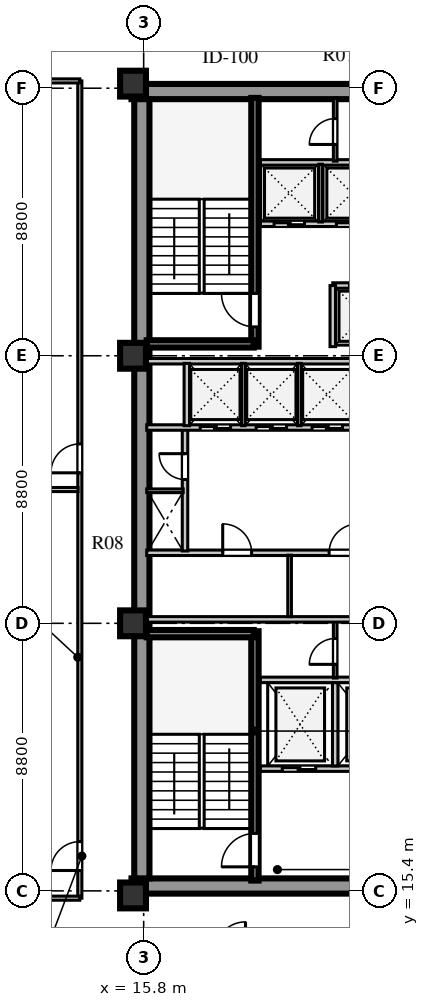
"""IFC4 building model, lengths in metres.
Left out: names, types, materials, properties, quantities, classifications, styles, units other than length and angle.
Written with IfcOpenShell. Run it as: python <this file> out.ifc"""

import sys

from ifc_helpers import new_model, si_unit, direction, frame, frame_2d, origin, origin_2d, place, context, subcontext, project, spatial, rectangle, extrude, element, fill, save


model = new_model("IFC4")
c1 = context("Model", 3, precision=1e-05, world=origin(), true_north=direction((0.0, 1.0)))
c2 = subcontext(c1, "Body", "Model", "MODEL_VIEW")
j1 = project(units=[si_unit("LENGTHUNIT", "METRE"), si_unit("PLANEANGLEUNIT", "RADIAN")], contexts=[c1])
p1 = place(None, origin())
s1 = spatial("IfcSite", under=j1, at=p1, CompositionType="ELEMENT")
p2 = place(p1, origin())
s2 = spatial("IfcBuilding", under=s1, at=p2, CompositionType="ELEMENT")
p3 = place(p2, frame((0.0, 0.0, 119.4)))
s3 = spatial("IfcBuildingStorey", under=s2, at=p3, CompositionType="ELEMENT", Elevation=119.4)
for number, where, z_axis, x_axis in (
    (1, (15.4, 15.56, 0.0), (0.0, 0.0, 1.0), (1.0, 0.0, 0.0)),
    (2, (15.4, 41.69, 0.0), (0.0, 0.0, 1.0), (1.0, 0.0, 0.0)),
):
    element("IfcWall", number, at=place(p3, frame(where, z_axis=z_axis, x_axis=x_axis)), inside=s3, PredefinedType="SHEAR", context=c2, shape_type="SweptSolid", body=[
        extrude(rectangle(XDim=9.68, YDim=0.5, at=frame_2d((4.84, 0.0))), origin(), (0.0, 0.0, 1.0), 3.6),
    ])
p4 = place(p3, frame((15.74, 15.81, 0.0), z_axis=(0.0, 0.0, 1.0), x_axis=(0.0, 1.0, 0.0)))
e3 = element("IfcWall", 3, at=p4, inside=s3, PredefinedType="SHEAR", context=c2, shape_type="SweptSolid", body=[
    extrude(rectangle(XDim=25.63, YDim=0.5, at=frame_2d((12.815, 0.0))), origin(), (0.0, 0.0, 1.0), 3.6),
])
for number, where, z_axis, x_axis in (
    (4, (15.45, 15.25, 0.0), (0.0, 0.0, 1.0), (1.0, 0.0, 0.0)),
    (5, (15.45, 24.2, 0.0), (0.0, 0.0, 1.0), (1.0, 0.0, 0.0)),
    (6, (15.45, 33.0, 0.0), (0.0, 0.0, 1.0), (1.0, 0.0, 0.0)),
    (7, (15.45, 41.95, 0.0), (0.0, 0.0, 1.0), (1.0, 0.0, 0.0)),
):
    element("IfcColumn", number, at=place(p3, frame(where, z_axis=z_axis, x_axis=x_axis)), inside=s3, PredefinedType="COLUMN", context=c2, shape_type="SweptSolid", body=[
        extrude(rectangle(XDim=0.85, YDim=0.85, at=origin_2d()), origin(), (0.0, 0.0, 1.0), 3.6),
    ])
p5 = place(p3, frame((19.46, 15.74, 0.0), z_axis=(0.0, 0.0, 1.0), x_axis=(0.0, 1.0, 0.0)))
e8 = element("IfcWall", 8, at=p5, inside=s3, PredefinedType="SHEAR", context=c2, shape_type="SweptSolid", body=[
    extrude(rectangle(XDim=8.2, YDim=0.24, at=frame_2d((4.1, 0.0))), origin(), (0.0, 0.0, 1.0), 3.85),
])
p6 = place(p5, frame((0.45, 0.0, 0.0)))
e9 = element("IfcOpeningElement", 9, at=p6, cuts=e8, PredefinedType="OPENING", context=c2, shape_type="SweptSolid", body=[
    extrude(rectangle(XDim=1.1, YDim=2.1, at=frame_2d((0.55, 1.05))), frame((0.0, 0.13, 0.0), z_axis=(0.0, -1.0, 0.0), x_axis=(1.0, 0.0, 0.0)), (0.0, 0.0, 1.0), 0.26),
])
p7 = place(p3, frame((15.9, 23.86, 0.0), z_axis=(0.0, 0.0, 1.0), x_axis=(1.0, 0.0, 0.0)))
e10 = element("IfcWall", 10, at=p7, inside=s3, PredefinedType="SHEAR", context=c2, shape_type="SweptSolid", body=[
    extrude(rectangle(XDim=3.52, YDim=0.24, at=frame_2d((1.76, 0.0))), origin(), (0.0, 0.0, 1.0), 3.85),
])
p8 = place(p3, frame((19.64, 19.42, 0.0), z_axis=(0.0, 0.0, 1.0), x_axis=(1.0, 0.0, 0.0)))
e11 = element("IfcWall", 11, at=p8, inside=s3, PredefinedType="SOLIDWALL", context=c2, shape_type="SweptSolid", body=[
    extrude(rectangle(XDim=4.94, YDim=0.18, at=frame_2d((2.47, 0.0))), origin(), (0.0, 0.0, 1.0), 3.6),
])
p9 = place(p8, frame((0.72, 0.0, 0.0)))
e12 = element("IfcOpeningElement", 12, at=p9, cuts=e11, PredefinedType="OPENING", context=c2, shape_type="SweptSolid", body=[
    extrude(rectangle(XDim=1.1, YDim=2.1, at=frame_2d((0.55, 1.05))), frame((0.0, 0.1, 0.0), z_axis=(0.0, -1.0, 0.0), x_axis=(1.0, 0.0, 0.0)), (0.0, 0.0, 1.0), 0.2),
])
p10 = place(p8, frame((3.02, 0.0, 0.0)))
e13 = element("IfcOpeningElement", 13, at=p10, cuts=e11, PredefinedType="OPENING", context=c2, shape_type="SweptSolid", body=[
    extrude(rectangle(XDim=1.1, YDim=2.1, at=frame_2d((0.55, 1.05))), frame((0.0, 0.1, 0.0), z_axis=(0.0, -1.0, 0.0), x_axis=(1.0, 0.0, 0.0)), (0.0, 0.0, 1.0), 0.2),
])
p11 = place(p3, frame((22.1, 19.51, 0.0), z_axis=(0.0, 0.0, 1.0), x_axis=(0.0, 1.0, 0.0)))
e14 = element("IfcWall", 14, at=p11, inside=s3, PredefinedType="SOLIDWALL", context=c2, shape_type="SweptSolid", body=[
    extrude(rectangle(XDim=2.74, YDim=0.18, at=frame_2d((1.37, 0.0))), origin(), (0.0, 0.0, 1.0), 3.6),
])
p12 = place(p3, frame((19.64, 22.34, 0.0), z_axis=(0.0, 0.0, 1.0), x_axis=(1.0, 0.0, 0.0)))
e15 = element("IfcWall", 15, at=p12, inside=s3, PredefinedType="SOLIDWALL", context=c2, shape_type="SweptSolid", body=[
    extrude(rectangle(XDim=4.94, YDim=0.18, at=frame_2d((2.47, 0.0))), origin(), (0.0, 0.0, 1.0), 3.6),
])
p13 = place(p3, frame((22.1, 22.4, 0.0), z_axis=(0.0, 0.0, 1.0), x_axis=(0.0, 1.0, 0.0)))
e16 = element("IfcWall", 16, at=p13, inside=s3, PredefinedType="PARTITIONING", context=c2, shape_type="SweptSolid", body=[
    extrude(rectangle(XDim=1.88, YDim=0.12, at=frame_2d((0.94, 0.0))), origin(), (0.0, 0.0, 1.0), 3.6),
])
p14 = place(p13, frame((0.45, 0.0, 0.0)))
e17 = element("IfcOpeningElement", 17, at=p14, cuts=e16, PredefinedType="OPENING", context=c2, shape_type="SweptSolid", body=[
    extrude(rectangle(XDim=0.85, YDim=2.06, at=frame_2d((0.425, 1.03))), frame((0.0, 0.07, 0.0), z_axis=(0.0, -1.0, 0.0), x_axis=(1.0, 0.0, 0.0)), (0.0, 0.0, 1.0), 0.14),
])
p15 = place(p3, frame((15.9, 26.52, 0.0), z_axis=(0.0, 0.0, 1.0), x_axis=(1.0, 0.0, 0.0)))
e18 = element("IfcWall", 18, at=p15, inside=s3, PredefinedType="SOLIDWALL", context=c2, shape_type="SweptSolid", body=[
    extrude(rectangle(XDim=8.68, YDim=0.18, at=frame_2d((4.34, 0.0))), origin(), (0.0, 0.0, 1.0), 3.6),
])
p16 = place(p15, frame((2.5, 0.0, 0.0)))
e19 = element("IfcOpeningElement", 19, at=p16, cuts=e18, PredefinedType="OPENING", context=c2, shape_type="SweptSolid", body=[
    extrude(rectangle(XDim=0.95, YDim=2.1, at=frame_2d((0.475, 1.05))), frame((0.0, 0.1, 0.0), z_axis=(0.0, -1.0, 0.0), x_axis=(1.0, 0.0, 0.0)), (0.0, 0.0, 1.0), 0.2),
])
p17 = place(p15, frame((6.0, 0.0, 0.0)))
e20 = element("IfcOpeningElement", 20, at=p17, cuts=e18, PredefinedType="OPENING", context=c2, shape_type="SweptSolid", body=[
    extrude(rectangle(XDim=0.95, YDim=2.1, at=frame_2d((0.475, 1.05))), frame((0.0, 0.1, 0.0), z_axis=(0.0, -1.0, 0.0), x_axis=(1.0, 0.0, 0.0)), (0.0, 0.0, 1.0), 0.2),
])
p18 = place(p3, frame((15.9, 24.33, 0.0), z_axis=(0.0, 0.0, 1.0), x_axis=(1.0, 0.0, 0.0)))
e21 = element("IfcWall", 21, at=p18, inside=s3, PredefinedType="SOLIDWALL", context=c2, shape_type="SweptSolid", body=[
    extrude(rectangle(XDim=8.68, YDim=0.18, at=frame_2d((4.34, 0.0))), origin(), (0.0, 0.0, 1.0), 2.95),
])
p19 = place(p3, frame((20.6, 24.42, 0.0), z_axis=(0.0, 0.0, 1.0), x_axis=(0.0, 1.0, 0.0)))
e22 = element("IfcWall", 22, at=p19, inside=s3, PredefinedType="PARTITIONING", context=c2, shape_type="SweptSolid", body=[
    extrude(rectangle(XDim=2.02, YDim=0.12, at=frame_2d((1.01, 0.0))), origin(), (0.0, 0.0, 1.0), 3.6),
])
p20 = place(p3, frame((17.16, 26.58, 0.0), z_axis=(0.0, 0.0, 1.0), x_axis=(0.0, 1.0, 0.0)))
e23 = element("IfcWall", 23, at=p20, inside=s3, PredefinedType="SOLIDWALL", context=c2, shape_type="SweptSolid", body=[
    extrude(rectangle(XDim=4.02, YDim=0.18, at=frame_2d((2.01, 0.0))), origin(), (0.0, 0.0, 1.0), 3.6),
])
p21 = place(p20, frame((2.35, 0.0, 0.0)))
e24 = element("IfcOpeningElement", 24, at=p21, cuts=e23, PredefinedType="OPENING", context=c2, shape_type="SweptSolid", body=[
    extrude(rectangle(XDim=0.85, YDim=2.06, at=frame_2d((0.425, 1.03))), frame((0.0, 0.1, 0.0), z_axis=(0.0, -1.0, 0.0), x_axis=(1.0, 0.0, 0.0)), (0.0, 0.0, 1.0), 0.2),
])
p22 = place(p3, frame((15.9, 28.56, 0.0), z_axis=(0.0, 0.0, 1.0), x_axis=(1.0, 0.0, 0.0)))
e25 = element("IfcWall", 25, at=p22, inside=s3, PredefinedType="PARTITIONING", context=c2, shape_type="SweptSolid", body=[
    extrude(rectangle(XDim=1.2, YDim=0.12, at=frame_2d((0.6, 0.0))), origin(), (0.0, 0.0, 1.0), 3.6),
])
p23 = place(p3, frame((15.9, 30.64, 0.0), z_axis=(0.0, 0.0, 1.0), x_axis=(1.0, 0.0, 0.0)))
e26 = element("IfcWall", 26, at=p23, inside=s3, PredefinedType="SOLIDWALL", context=c2, shape_type="SweptSolid", body=[
    extrude(rectangle(XDim=8.68, YDim=0.18, at=frame_2d((4.34, 0.0))), origin(), (0.0, 0.0, 1.0), 3.6),
])
p24 = place(p23, frame((1.76, 0.0, 0.0)))
e27 = element("IfcOpeningElement", 27, at=p24, cuts=e26, PredefinedType="OPENING", context=c2, shape_type="SweptSolid", body=[
    extrude(rectangle(XDim=1.0, YDim=2.1, at=frame_2d((0.5, 1.05))), frame((0.0, 0.1, 0.0), z_axis=(0.0, -1.0, 0.0), x_axis=(1.0, 0.0, 0.0)), (0.0, 0.0, 1.0), 0.2),
])
p25 = place(p23, frame((3.6, 0.0, 0.0)))
e28 = element("IfcOpeningElement", 28, at=p25, cuts=e26, PredefinedType="OPENING", context=c2, shape_type="SweptSolid", body=[
    extrude(rectangle(XDim=1.0, YDim=2.1, at=frame_2d((0.5, 1.05))), frame((0.0, 0.1, 0.0), z_axis=(0.0, -1.0, 0.0), x_axis=(1.0, 0.0, 0.0)), (0.0, 0.0, 1.0), 0.2),
])
p26 = place(p23, frame((5.44, 0.0, 0.0)))
e29 = element("IfcOpeningElement", 29, at=p26, cuts=e26, PredefinedType="OPENING", context=c2, shape_type="SweptSolid", body=[
    extrude(rectangle(XDim=1.0, YDim=2.1, at=frame_2d((0.5, 1.05))), frame((0.0, 0.1, 0.0), z_axis=(0.0, -1.0, 0.0), x_axis=(1.0, 0.0, 0.0)), (0.0, 0.0, 1.0), 0.2),
])
p27 = place(p23, frame((7.28, 0.0, 0.0)))
e30 = element("IfcOpeningElement", 30, at=p27, cuts=e26, PredefinedType="OPENING", context=c2, shape_type="SweptSolid", body=[
    extrude(rectangle(XDim=1.0, YDim=2.1, at=frame_2d((0.5, 1.05))), frame((0.0, 0.1, 0.0), z_axis=(0.0, -1.0, 0.0), x_axis=(1.0, 0.0, 0.0)), (0.0, 0.0, 1.0), 0.2),
])
p28 = place(p3, frame((15.9, 32.82, 0.0), z_axis=(0.0, 0.0, 1.0), x_axis=(1.0, 0.0, 0.0)))
e31 = element("IfcWall", 31, at=p28, inside=s3, PredefinedType="SOLIDWALL", context=c2, shape_type="SweptSolid", body=[
    extrude(rectangle(XDim=8.68, YDim=0.18, at=frame_2d((4.34, 0.0))), origin(), (0.0, 0.0, 1.0), 2.95),
])
p29 = place(p3, frame((17.22, 30.7, 0.0), z_axis=(0.0, 0.0, 1.0), x_axis=(0.0, 1.0, 0.0)))
e32 = element("IfcWall", 32, at=p29, inside=s3, PredefinedType="SOLIDWALL", context=c2, shape_type="SweptSolid", body=[
    extrude(rectangle(XDim=2.05, YDim=0.18, at=frame_2d((1.025, 0.0))), origin(), (0.0, 0.0, 1.0), 3.6),
])
for number, where, z_axis, x_axis in (
    (33, (19.08, 30.7, 0.0), (0.0, 0.0, 1.0), (0.0, 1.0, 0.0)),
    (34, (20.92, 30.7, 0.0), (0.0, 0.0, 1.0), (0.0, 1.0, 0.0)),
):
    element("IfcWall", number, at=place(p3, frame(where, z_axis=z_axis, x_axis=x_axis)), inside=s3, PredefinedType="PARTITIONING", context=c2, shape_type="SweptSolid", body=[
        extrude(rectangle(XDim=2.05, YDim=0.12, at=frame_2d((1.025, 0.0))), origin(), (0.0, 0.0, 1.0), 3.6),
    ])
p30 = place(p3, frame((19.46, 33.3, 0.0), z_axis=(0.0, 0.0, 1.0), x_axis=(0.0, 1.0, 0.0)))
e35 = element("IfcWall", 35, at=p30, inside=s3, PredefinedType="SHEAR", context=c2, shape_type="SweptSolid", body=[
    extrude(rectangle(XDim=8.18, YDim=0.24, at=frame_2d((4.09, 0.0))), origin(), (0.0, 0.0, 1.0), 3.85),
])
p31 = place(p30, frame((0.65, 0.0, 0.0)))
e36 = element("IfcOpeningElement", 36, at=p31, cuts=e35, PredefinedType="OPENING", context=c2, shape_type="SweptSolid", body=[
    extrude(rectangle(XDim=1.1, YDim=2.1, at=frame_2d((0.55, 1.05))), frame((0.0, 0.13, 0.0), z_axis=(0.0, -1.0, 0.0), x_axis=(1.0, 0.0, 0.0)), (0.0, 0.0, 1.0), 0.26),
])
p32 = place(p3, frame((15.9, 33.39, 0.0), z_axis=(0.0, 0.0, 1.0), x_axis=(1.0, 0.0, 0.0)))
e37 = element("IfcWall", 37, at=p32, inside=s3, PredefinedType="SHEAR", context=c2, shape_type="SweptSolid", body=[
    extrude(rectangle(XDim=3.52, YDim=0.24, at=frame_2d((1.76, 0.0))), origin(), (0.0, 0.0, 1.0), 3.85),
])
p33 = place(p3, frame((22.02, 35.31, 0.0), z_axis=(0.0, 0.0, 1.0), x_axis=(1.0, 0.0, 0.0)))
e38 = element("IfcWall", 38, at=p33, inside=s3, PredefinedType="SOLIDWALL", context=c2, shape_type="SweptSolid", body=[
    extrude(rectangle(XDim=2.56, YDim=0.18, at=frame_2d((1.28, 0.0))), origin(), (0.0, 0.0, 1.0), 3.6),
])
p34 = place(p33, frame((0.55, 0.0, 0.0)))
e39 = element("IfcOpeningElement", 39, at=p34, cuts=e38, PredefinedType="OPENING", context=c2, shape_type="SweptSolid", body=[
    extrude(rectangle(XDim=1.0, YDim=2.1, at=frame_2d((0.5, 1.05))), frame((0.0, 0.1, 0.0), z_axis=(0.0, -1.0, 0.0), x_axis=(1.0, 0.0, 0.0)), (0.0, 0.0, 1.0), 0.2),
])
p35 = place(p3, frame((22.02, 33.3, 0.0), z_axis=(0.0, 0.0, 1.0), x_axis=(0.0, 1.0, 0.0)))
e40 = element("IfcWall", 40, at=p35, inside=s3, PredefinedType="SOLIDWALL", context=c2, shape_type="SweptSolid", body=[
    extrude(rectangle(XDim=2.01, YDim=0.18, at=frame_2d((1.005, 0.0))), origin(), (0.0, 0.0, 1.0), 3.6),
])
p36 = place(p3, frame((19.64, 37.34, 0.0), z_axis=(0.0, 0.0, 1.0), x_axis=(1.0, 0.0, 0.0)))
e41 = element("IfcWall", 41, at=p36, inside=s3, PredefinedType="SOLIDWALL", context=c2, shape_type="SweptSolid", body=[
    extrude(rectangle(XDim=4.94, YDim=0.18, at=frame_2d((2.47, 0.0))), origin(), (0.0, 0.0, 1.0), 3.6),
])
p37 = place(p36, frame((0.45, 0.0, 0.0)))
e42 = element("IfcOpeningElement", 42, at=p37, cuts=e41, PredefinedType="OPENING", context=c2, shape_type="SweptSolid", body=[
    extrude(rectangle(XDim=1.0, YDim=2.1, at=frame_2d((0.5, 1.05))), frame((0.0, 0.1, 0.0), z_axis=(0.0, -1.0, 0.0), x_axis=(1.0, 0.0, 0.0)), (0.0, 0.0, 1.0), 0.2),
])
p38 = place(p36, frame((2.5, 0.0, 0.0)))
e43 = element("IfcOpeningElement", 43, at=p38, cuts=e41, PredefinedType="OPENING", context=c2, shape_type="SweptSolid", body=[
    extrude(rectangle(XDim=1.0, YDim=2.1, at=frame_2d((0.5, 1.05))), frame((0.0, 0.1, 0.0), z_axis=(0.0, -1.0, 0.0), x_axis=(1.0, 0.0, 0.0)), (0.0, 0.0, 1.0), 0.2),
])
p39 = place(p3, frame((19.64, 39.36, 0.0), z_axis=(0.0, 0.0, 1.0), x_axis=(1.0, 0.0, 0.0)))
e44 = element("IfcWall", 44, at=p39, inside=s3, PredefinedType="SOLIDWALL", context=c2, shape_type="SweptSolid", body=[
    extrude(rectangle(XDim=4.94, YDim=0.18, at=frame_2d((2.47, 0.0))), origin(), (0.0, 0.0, 1.0), 3.6),
])
p40 = place(p3, frame((21.62, 37.4, 0.0), z_axis=(0.0, 0.0, 1.0), x_axis=(0.0, 1.0, 0.0)))
e45 = element("IfcWall", 45, at=p40, inside=s3, PredefinedType="PARTITIONING", context=c2, shape_type="SweptSolid", body=[
    extrude(rectangle(XDim=1.9, YDim=0.12, at=frame_2d((0.95, 0.0))), origin(), (0.0, 0.0, 1.0), 3.6),
])
p41 = place(p3, frame((22.1, 39.4, 0.0), z_axis=(0.0, 0.0, 1.0), x_axis=(0.0, 1.0, 0.0)))
e46 = element("IfcWall", 46, at=p41, inside=s3, PredefinedType="PARTITIONING", context=c2, shape_type="SweptSolid", body=[
    extrude(rectangle(XDim=2.08, YDim=0.12, at=frame_2d((1.04, 0.0))), origin(), (0.0, 0.0, 1.0), 3.6),
])
p42 = place(p41, frame((0.55, 0.0, 0.0)))
e47 = element("IfcOpeningElement", 47, at=p42, cuts=e46, PredefinedType="OPENING", context=c2, shape_type="SweptSolid", body=[
    extrude(rectangle(XDim=0.85, YDim=2.06, at=frame_2d((0.425, 1.03))), frame((0.0, 0.07, 0.0), z_axis=(0.0, -1.0, 0.0), x_axis=(1.0, 0.0, 0.0)), (0.0, 0.0, 1.0), 0.14),
])
p43 = place(p3, frame((13.7, 15.16, 0.0), z_axis=(0.0, 0.0, 1.0), x_axis=(0.0, 1.0, 0.0)))
e48 = element("IfcWall", 48, at=p43, inside=s3, PredefinedType="PARTITIONING", context=c2, shape_type="SweptSolid", body=[
    extrude(rectangle(XDim=26.88, YDim=0.135, at=frame_2d((13.44, 0.0))), origin(), (0.0, 0.0, 1.0), 3.6),
])
p44 = place(p43, frame((0.91, 0.0, 0.0)))
e49 = element("IfcOpeningElement", 49, at=p44, cuts=e48, PredefinedType="OPENING", context=c2, shape_type="SweptSolid", body=[
    extrude(rectangle(XDim=0.95, YDim=2.1, at=frame_2d((0.475, 1.05))), frame((0.0, 0.078, 0.0), z_axis=(0.0, -1.0, 0.0), x_axis=(1.0, 0.0, 0.0)), (0.0, 0.0, 1.0), 0.155),
])
p45 = place(p43, frame((13.99, 0.0, 0.0)))
e50 = element("IfcOpeningElement", 50, at=p45, cuts=e48, PredefinedType="OPENING", context=c2, shape_type="SweptSolid", body=[
    extrude(rectangle(XDim=0.95, YDim=2.1, at=frame_2d((0.475, 1.05))), frame((0.0, 0.078, 0.0), z_axis=(0.0, -1.0, 0.0), x_axis=(1.0, 0.0, 0.0)), (0.0, 0.0, 1.0), 0.155),
])
for number, where, z_axis, x_axis in (
    (51, (10.48, 15.16, 0.0), (0.0, 0.0, 1.0), (1.0, 0.0, 0.0)),
    (52, (10.48, 42.04, 0.0), (0.0, 0.0, 1.0), (1.0, 0.0, 0.0)),
):
    element("IfcWall", number, at=place(p3, frame(where, z_axis=z_axis, x_axis=x_axis)), inside=s3, PredefinedType="PARTITIONING", context=c2, shape_type="SweptSolid", body=[
        extrude(rectangle(XDim=3.22, YDim=0.135, at=frame_2d((1.61, 0.0))), origin(), (0.0, 0.0, 1.0), 3.1),
    ])
p46 = place(p3, frame((10.48, 28.6, 0.0), z_axis=(0.0, 0.0, 1.0), x_axis=(1.0, 0.0, 0.0)))
e53 = element("IfcWall", 53, at=p46, inside=s3, PredefinedType="PARTITIONING", context=c2, shape_type="SweptSolid", body=[
    extrude(rectangle(XDim=3.16, YDim=0.135, at=frame_2d((1.58, 0.0))), origin(), (0.0, 0.0, 1.0), 3.6),
])
p47 = place(p6, origin())
e54 = element("IfcDoor", 54, at=p47, inside=s3, OperationType="SINGLE_SWING_LEFT", PredefinedType="DOOR", context=c2, shape_type="SweptSolid", body=[
    extrude(rectangle(XDim=1.1, YDim=2.1, at=frame_2d((0.55, 1.05))), frame((0.0, 0.025, 0.0), z_axis=(0.0, -1.0, 0.0), x_axis=(1.0, 0.0, 0.0)), (0.0, 0.0, 1.0), 0.05),
])
fill(e9, e54)
p48 = place(p9, origin())
e55 = element("IfcDoor", 55, at=p48, inside=s3, OperationType="DOUBLE_DOOR_SLIDING", PredefinedType="DOOR", context=c2, shape_type="SweptSolid", body=[
    extrude(rectangle(XDim=1.1, YDim=2.1, at=frame_2d((0.55, 1.05))), frame((0.0, 0.025, 0.0), z_axis=(0.0, -1.0, 0.0), x_axis=(1.0, 0.0, 0.0)), (0.0, 0.0, 1.0), 0.05),
])
fill(e12, e55)
p49 = place(p14, origin())
e56 = element("IfcDoor", 56, at=p49, inside=s3, OperationType="SINGLE_SWING_LEFT", PredefinedType="DOOR", context=c2, shape_type="SweptSolid", body=[
    extrude(rectangle(XDim=0.85, YDim=2.06, at=frame_2d((0.425, 1.03))), frame((0.0, 0.025, 0.0), z_axis=(0.0, -1.0, 0.0), x_axis=(1.0, 0.0, 0.0)), (0.0, 0.0, 1.0), 0.05),
])
fill(e17, e56)
p50 = place(p16, origin())
e57 = element("IfcDoor", 57, at=p50, inside=s3, OperationType="SINGLE_SWING_LEFT", PredefinedType="DOOR", context=c2, shape_type="SweptSolid", body=[
    extrude(rectangle(XDim=0.95, YDim=2.1, at=frame_2d((0.475, 1.05))), frame((0.0, 0.025, 0.0), z_axis=(0.0, -1.0, 0.0), x_axis=(1.0, 0.0, 0.0)), (0.0, 0.0, 1.0), 0.05),
])
fill(e19, e57)
p51 = place(p17, origin())
e58 = element("IfcDoor", 58, at=p51, inside=s3, OperationType="SINGLE_SWING_RIGHT", PredefinedType="DOOR", context=c2, shape_type="SweptSolid", body=[
    extrude(rectangle(XDim=0.95, YDim=2.1, at=frame_2d((0.475, 1.05))), frame((0.0, 0.025, 0.0), z_axis=(0.0, -1.0, 0.0), x_axis=(1.0, 0.0, 0.0)), (0.0, 0.0, 1.0), 0.05),
])
fill(e20, e58)
p52 = place(p21, origin())
e59 = element("IfcDoor", 59, at=p52, inside=s3, OperationType="SINGLE_SWING_RIGHT", PredefinedType="DOOR", context=c2, shape_type="SweptSolid", body=[
    extrude(rectangle(XDim=0.85, YDim=2.06, at=frame_2d((0.425, 1.03))), frame((0.0, 0.025, 0.0), z_axis=(0.0, -1.0, 0.0), x_axis=(1.0, 0.0, 0.0)), (0.0, 0.0, 1.0), 0.05),
])
fill(e24, e59)
p53 = place(p24, frame((1.0, 0.0, 0.0), z_axis=(0.0, 0.0, 1.0), x_axis=(-1.0, 0.0, 0.0)))
e60 = element("IfcDoor", 60, at=p53, inside=s3, OperationType="DOUBLE_DOOR_SLIDING", PredefinedType="DOOR", context=c2, shape_type="SweptSolid", body=[
    extrude(rectangle(XDim=1.0, YDim=2.1, at=frame_2d((0.5, 1.05))), frame((0.0, 0.025, 0.0), z_axis=(0.0, -1.0, 0.0), x_axis=(1.0, 0.0, 0.0)), (0.0, 0.0, 1.0), 0.05),
])
fill(e27, e60)
p54 = place(p25, frame((1.0, 0.0, 0.0), z_axis=(0.0, 0.0, 1.0), x_axis=(-1.0, 0.0, 0.0)))
e61 = element("IfcDoor", 61, at=p54, inside=s3, OperationType="DOUBLE_DOOR_SLIDING", PredefinedType="DOOR", context=c2, shape_type="SweptSolid", body=[
    extrude(rectangle(XDim=1.0, YDim=2.1, at=frame_2d((0.5, 1.05))), frame((0.0, 0.025, 0.0), z_axis=(0.0, -1.0, 0.0), x_axis=(1.0, 0.0, 0.0)), (0.0, 0.0, 1.0), 0.05),
])
fill(e28, e61)
p55 = place(p26, frame((1.0, 0.0, 0.0), z_axis=(0.0, 0.0, 1.0), x_axis=(-1.0, 0.0, 0.0)))
e62 = element("IfcDoor", 62, at=p55, inside=s3, OperationType="DOUBLE_DOOR_SLIDING", PredefinedType="DOOR", context=c2, shape_type="SweptSolid", body=[
    extrude(rectangle(XDim=1.0, YDim=2.1, at=frame_2d((0.5, 1.05))), frame((0.0, 0.025, 0.0), z_axis=(0.0, -1.0, 0.0), x_axis=(1.0, 0.0, 0.0)), (0.0, 0.0, 1.0), 0.05),
])
fill(e29, e62)
p56 = place(p31, origin())
e63 = element("IfcDoor", 63, at=p56, inside=s3, OperationType="SINGLE_SWING_RIGHT", PredefinedType="DOOR", context=c2, shape_type="SweptSolid", body=[
    extrude(rectangle(XDim=1.1, YDim=2.1, at=frame_2d((0.55, 1.05))), frame((0.0, 0.025, 0.0), z_axis=(0.0, -1.0, 0.0), x_axis=(1.0, 0.0, 0.0)), (0.0, 0.0, 1.0), 0.05),
])
fill(e36, e63)
p57 = place(p37, frame((1.0, 0.0, 0.0), z_axis=(0.0, 0.0, 1.0), x_axis=(-1.0, 0.0, 0.0)))
e64 = element("IfcDoor", 64, at=p57, inside=s3, OperationType="DOUBLE_DOOR_SLIDING", PredefinedType="DOOR", context=c2, shape_type="SweptSolid", body=[
    extrude(rectangle(XDim=1.0, YDim=2.1, at=frame_2d((0.5, 1.05))), frame((0.0, 0.025, 0.0), z_axis=(0.0, -1.0, 0.0), x_axis=(1.0, 0.0, 0.0)), (0.0, 0.0, 1.0), 0.05),
])
fill(e42, e64)
p58 = place(p38, frame((1.0, 0.0, 0.0), z_axis=(0.0, 0.0, 1.0), x_axis=(-1.0, 0.0, 0.0)))
e65 = element("IfcDoor", 65, at=p58, inside=s3, OperationType="DOUBLE_DOOR_SLIDING", PredefinedType="DOOR", context=c2, shape_type="SweptSolid", body=[
    extrude(rectangle(XDim=1.0, YDim=2.1, at=frame_2d((0.5, 1.05))), frame((0.0, 0.025, 0.0), z_axis=(0.0, -1.0, 0.0), x_axis=(1.0, 0.0, 0.0)), (0.0, 0.0, 1.0), 0.05),
])
fill(e43, e65)
p59 = place(p42, origin())
e66 = element("IfcDoor", 66, at=p59, inside=s3, OperationType="SINGLE_SWING_LEFT", PredefinedType="DOOR", context=c2, shape_type="SweptSolid", body=[
    extrude(rectangle(XDim=0.85, YDim=2.06, at=frame_2d((0.425, 1.03))), frame((0.0, 0.025, 0.0), z_axis=(0.0, -1.0, 0.0), x_axis=(1.0, 0.0, 0.0)), (0.0, 0.0, 1.0), 0.05),
])
fill(e47, e66)
p60 = place(p44, origin())
e67 = element("IfcDoor", 67, at=p60, inside=s3, OperationType="SINGLE_SWING_LEFT", PredefinedType="DOOR", context=c2, shape_type="SweptSolid", body=[
    extrude(rectangle(XDim=0.95, YDim=2.1, at=frame_2d((0.475, 1.05))), frame((0.0, 0.025, 0.0), z_axis=(0.0, -1.0, 0.0), x_axis=(1.0, 0.0, 0.0)), (0.0, 0.0, 1.0), 0.05),
])
fill(e49, e67)
p61 = place(p45, origin())
e68 = element("IfcDoor", 68, at=p61, inside=s3, OperationType="SINGLE_SWING_LEFT", PredefinedType="DOOR", context=c2, shape_type="SweptSolid", body=[
    extrude(rectangle(XDim=0.95, YDim=2.1, at=frame_2d((0.475, 1.05))), frame((0.0, 0.025, 0.0), z_axis=(0.0, -1.0, 0.0), x_axis=(1.0, 0.0, 0.0)), (0.0, 0.0, 1.0), 0.05),
])
fill(e50, e68)
save(model, sys.argv[1])
